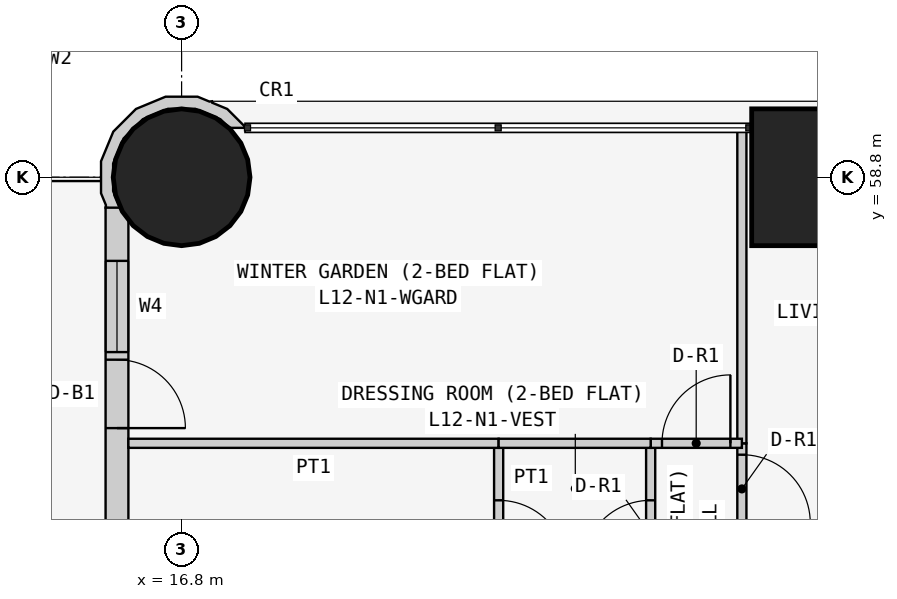
"""IFC4 building model, lengths in metres.
Left out: names, types, materials, properties, quantities, classifications, styles, units other than length and angle.
Written with IfcOpenShell. Run it as: python <this file> out.ifc"""

import sys

from ifc_helpers import new_model, si_unit, direction, frame, frame_2d, origin, origin_2d, place, context, subcontext, project, spatial, polyline, rectangle, circle, outline, extrude, element, fill, save


model = new_model("IFC4")
c1 = context("Model", 3, precision=1e-05, world=origin(), true_north=direction((0.0, 1.0)))
c2 = subcontext(c1, "Body", "Model", "MODEL_VIEW")
j1 = project(units=[si_unit("LENGTHUNIT", "METRE"), si_unit("PLANEANGLEUNIT", "RADIAN")], contexts=[c1])
p1 = place(None, origin())
s1 = spatial("IfcSite", under=j1, at=p1, CompositionType="ELEMENT")
p2 = place(p1, origin())
s2 = spatial("IfcBuilding", under=s1, at=p2, CompositionType="ELEMENT")
p3 = place(p2, frame((0.0, 0.0, 52.5)))
s3 = spatial("IfcBuildingStorey", under=s2, at=p3, CompositionType="ELEMENT", Elevation=52.5)
p4 = place(p3, frame((16.8, 58.8, 0.0), z_axis=(0.0, 0.0, 1.0), x_axis=(1.0, 0.0, 0.0)))
e1 = element("IfcColumn", 1, at=p4, inside=s3, PredefinedType="COLUMN", context=c2, shape_type="SweptSolid", body=[
    extrude(circle(Radius=0.9, at=origin_2d()), origin(), (0.0, 0.0, 1.0), 3.6),
])
p5 = place(p3, frame((25.2, 58.8, 0.0), z_axis=(0.0, 0.0, 1.0), x_axis=(1.0, 0.0, 0.0)))
e2 = element("IfcColumn", 2, at=p5, inside=s3, PredefinedType="COLUMN", context=c2, shape_type="SweptSolid", body=[
    extrude(rectangle(XDim=1.8, YDim=1.8, at=origin_2d()), origin(), (0.0, 0.0, 1.0), 3.6),
])
p6 = place(p3, frame((15.95, 58.4, 0.0), z_axis=(0.0, 0.0, 1.0), x_axis=(0.0, -1.0, 0.0)))
e3 = element("IfcWall", 3, at=p6, inside=s3, PredefinedType="SOLIDWALL", context=c2, shape_type="SweptSolid", body=[
    extrude(rectangle(XDim=15.7, YDim=0.3, at=frame_2d((7.85, 0.0))), origin(), (0.0, 0.0, 1.0), 3.45),
])
p7 = place(p6, frame((12.4, 0.0, 0.9)))
e4 = element("IfcOpeningElement", 4, at=p7, cuts=e3, PredefinedType="OPENING", context=c2, shape_type="SweptSolid", body=[
    extrude(rectangle(XDim=1.8, YDim=1.5, at=frame_2d((0.9, 0.75))), frame((0.0, 0.16, 0.0), z_axis=(0.0, -1.0, 0.0), x_axis=(1.0, 0.0, 0.0)), (0.0, 0.0, 1.0), 0.32),
])
p8 = place(p6, frame((9.55, 0.0, 1.5)))
e5 = element("IfcOpeningElement", 5, at=p8, cuts=e3, PredefinedType="OPENING", context=c2, shape_type="SweptSolid", body=[
    extrude(rectangle(XDim=0.9, YDim=0.7, at=frame_2d((0.45, 0.35))), frame((0.0, 0.16, 0.0), z_axis=(0.0, -1.0, 0.0), x_axis=(1.0, 0.0, 0.0)), (0.0, 0.0, 1.0), 0.32),
])
p9 = place(p6, frame((5.1, 0.0, 0.9)))
e6 = element("IfcOpeningElement", 6, at=p9, cuts=e3, PredefinedType="OPENING", context=c2, shape_type="SweptSolid", body=[
    extrude(rectangle(XDim=1.8, YDim=1.5, at=frame_2d((0.9, 0.75))), frame((0.0, 0.16, 0.0), z_axis=(0.0, -1.0, 0.0), x_axis=(1.0, 0.0, 0.0)), (0.0, 0.0, 1.0), 0.32),
])
p10 = place(p6, frame((2.0, 0.0, 0.0)))
e7 = element("IfcOpeningElement", 7, at=p10, cuts=e3, PredefinedType="OPENING", context=c2, shape_type="SweptSolid", body=[
    extrude(rectangle(XDim=0.9, YDim=2.4, at=frame_2d((0.45, 1.2))), frame((0.0, 0.16, 0.0), z_axis=(0.0, -1.0, 0.0), x_axis=(1.0, 0.0, 0.0)), (0.0, 0.0, 1.0), 0.32),
])
p11 = place(p6, frame((0.7, 0.0, 0.9)))
e8 = element("IfcOpeningElement", 8, at=p11, cuts=e3, PredefinedType="OPENING", context=c2, shape_type="SweptSolid", body=[
    extrude(rectangle(XDim=1.2, YDim=1.5, at=frame_2d((0.6, 0.75))), frame((0.0, 0.16, 0.0), z_axis=(0.0, -1.0, 0.0), x_axis=(1.0, 0.0, 0.0)), (0.0, 0.0, 1.0), 0.32),
])
p12 = place(p3, frame((17.567, 59.411, 0.0), z_axis=(0.0, 0.0, 1.0), x_axis=(-0.377204953059, 0.926129809145, 0.0)))
e9 = element("IfcWall", 9, at=p12, inside=s3, PredefinedType="SOLIDWALL", context=c2, shape_type="SweptSolid", body=[
    extrude(outline(polyline([(-0.27, 2.017), (-0.37, 1.841), (-0.102, 1.842), (0.23, 1.707), (0.484, 1.455), (0.624, 1.125), (0.626, 0.766), (0.491, 0.434), (0.239, 0.18), (0.09, 0.117), (0.011, -0.078), (0.024, -0.083), (0.329, 0.045), (0.48, 0.198), (0.499, 0.193), (0.508, 0.225), (0.626, 0.345), (0.785, 0.736), (0.782, 1.157), (0.619, 1.546), (0.319, 1.842), (-0.072, 2.002), (-0.24, 2.0), (-0.27, 2.017)])), origin(), (0.0, 0.0, 1.0), 3.45),
])
p13 = place(p3, frame((24.171, 55.3, 0.0), z_axis=(0.0, 0.0, 1.0), x_axis=(0.0, -1.0, 0.0)))
e10 = element("IfcWall", 10, at=p13, inside=s3, PredefinedType="PARTITIONING", context=c2, shape_type="SweptSolid", body=[
    extrude(rectangle(XDim=1.2, YDim=0.12, at=frame_2d((0.6, 0.0))), origin(), (0.0, 0.0, 1.0), 3.45),
])
p14 = place(p13, frame((0.15, 0.0, 0.0)))
e11 = element("IfcOpeningElement", 11, at=p14, cuts=e10, PredefinedType="OPENING", context=c2, shape_type="SweptSolid", body=[
    extrude(rectangle(XDim=0.9, YDim=2.1, at=frame_2d((0.45, 1.05))), frame((0.0, 0.07, 0.0), z_axis=(0.0, -1.0, 0.0), x_axis=(1.0, 0.0, 0.0)), (0.0, 0.0, 1.0), 0.14),
])
p15 = place(p3, frame((24.171, 59.45, 0.0), z_axis=(0.0, 0.0, 1.0), x_axis=(0.0, -1.0, 0.0)))
e12 = element("IfcWall", 12, at=p15, inside=s3, PredefinedType="PARTITIONING", context=c2, shape_type="SweptSolid", body=[
    extrude(rectangle(XDim=4.15, YDim=0.12, at=frame_2d((2.075, 0.0))), origin(), (0.0, 0.0, 1.0), 3.45),
])
p16 = place(p3, frame((22.971, 55.3, 0.0), z_axis=(0.0, 0.0, 1.0), x_axis=(0.0, -1.0, 0.0)))
e13 = element("IfcWall", 13, at=p16, inside=s3, PredefinedType="PARTITIONING", context=c2, shape_type="SweptSolid", body=[
    extrude(rectangle(XDim=2.3, YDim=0.12, at=frame_2d((1.15, 0.0))), origin(), (0.0, 0.0, 1.0), 3.45),
])
p17 = place(p16, frame((0.75, 0.0, 0.0)))
e14 = element("IfcOpeningElement", 14, at=p17, cuts=e13, PredefinedType="OPENING", context=c2, shape_type="SweptSolid", body=[
    extrude(rectangle(XDim=0.9, YDim=2.1, at=frame_2d((0.45, 1.05))), frame((0.0, 0.07, 0.0), z_axis=(0.0, -1.0, 0.0), x_axis=(1.0, 0.0, 0.0)), (0.0, 0.0, 1.0), 0.14),
])
p18 = place(p3, frame((24.171, 55.3, 0.0), z_axis=(0.0, 0.0, 1.0), x_axis=(-1.0, 0.0, 0.0)))
e15 = element("IfcWall", 15, at=p18, inside=s3, PredefinedType="PARTITIONING", context=c2, shape_type="SweptSolid", body=[
    extrude(rectangle(XDim=1.2, YDim=0.12, at=frame_2d((0.6, 0.0))), origin(), (0.0, 0.0, 1.0), 3.45),
])
p19 = place(p18, frame((0.151, 0.0, 0.0)))
e16 = element("IfcOpeningElement", 16, at=p19, cuts=e15, PredefinedType="OPENING", context=c2, shape_type="SweptSolid", body=[
    extrude(rectangle(XDim=0.9, YDim=2.1, at=frame_2d((0.45, 1.05))), frame((0.0, 0.07, 0.0), z_axis=(0.0, -1.0, 0.0), x_axis=(1.0, 0.0, 0.0)), (0.0, 0.0, 1.0), 0.14),
])
p20 = place(p3, frame((20.971, 55.3, 0.0), z_axis=(0.0, 0.0, 1.0), x_axis=(0.0, -1.0, 0.0)))
e17 = element("IfcWall", 17, at=p20, inside=s3, PredefinedType="PARTITIONING", context=c2, shape_type="SweptSolid", body=[
    extrude(rectangle(XDim=2.3, YDim=0.12, at=frame_2d((1.15, 0.0))), origin(), (0.0, 0.0, 1.0), 2.848),
])
p21 = place(p20, frame((0.75, 0.0, 0.0)))
e18 = element("IfcOpeningElement", 18, at=p21, cuts=e17, PredefinedType="OPENING", context=c2, shape_type="SweptSolid", body=[
    extrude(rectangle(XDim=0.9, YDim=2.1, at=frame_2d((0.45, 1.05))), frame((0.0, 0.07, 0.0), z_axis=(0.0, -1.0, 0.0), x_axis=(1.0, 0.0, 0.0)), (0.0, 0.0, 1.0), 0.14),
])
p22 = place(p3, frame((16.1, 55.3, 0.0), z_axis=(0.0, 0.0, 1.0), x_axis=(1.0, 0.0, 0.0)))
e19 = element("IfcWall", 19, at=p22, inside=s3, PredefinedType="PARTITIONING", context=c2, shape_type="SweptSolid", body=[
    extrude(rectangle(XDim=4.871, YDim=0.12, at=frame_2d((2.436, 0.0))), origin(), (0.0, 0.0, 1.0), 3.45),
])
p23 = place(p3, frame((22.971, 55.3, 0.0), z_axis=(0.0, 0.0, 1.0), x_axis=(-1.0, 0.0, 0.0)))
e20 = element("IfcWall", 20, at=p23, inside=s3, PredefinedType="PARTITIONING", context=c2, shape_type="SweptSolid", body=[
    extrude(rectangle(XDim=2.0, YDim=0.12, at=frame_2d((1.0, 0.0))), origin(), (0.0, 0.0, 1.0), 3.45),
])
p24 = place(p10, origin())
e21 = element("IfcDoor", 21, at=p24, inside=s3, OperationType="SINGLE_SWING_RIGHT", PredefinedType="DOOR", context=c2, shape_type="SweptSolid", body=[
    extrude(rectangle(XDim=0.9, YDim=2.4, at=frame_2d((0.45, 1.2))), frame((0.0, 0.025, 0.0), z_axis=(0.0, -1.0, 0.0), x_axis=(1.0, 0.0, 0.0)), (0.0, 0.0, 1.0), 0.05),
])
fill(e7, e21)
p25 = place(p11, origin())
e22 = element("IfcWindow", 22, at=p25, inside=s3, PartitioningType="SINGLE_PANEL", PredefinedType="WINDOW", context=c2, shape_type="SweptSolid", body=[
    extrude(rectangle(XDim=1.2, YDim=1.5, at=frame_2d((0.6, 0.75))), frame((0.0, 0.03, 0.0), z_axis=(0.0, -1.0, 0.0), x_axis=(1.0, 0.0, 0.0)), (0.0, 0.0, 1.0), 0.06),
])
fill(e8, e22)
p26 = place(p14, origin())
e23 = element("IfcDoor", 23, at=p26, inside=s3, OperationType="SINGLE_SWING_RIGHT", PredefinedType="DOOR", context=c2, shape_type="SweptSolid", body=[
    extrude(rectangle(XDim=0.9, YDim=2.1, at=frame_2d((0.45, 1.05))), frame((0.0, 0.025, 0.0), z_axis=(0.0, -1.0, 0.0), x_axis=(1.0, 0.0, 0.0)), (0.0, 0.0, 1.0), 0.05),
])
fill(e11, e23)
p27 = place(p17, frame((0.9, 0.0, 0.0), z_axis=(0.0, 0.0, 1.0), x_axis=(-1.0, 0.0, 0.0)))
e24 = element("IfcDoor", 24, at=p27, inside=s3, OperationType="SINGLE_SWING_LEFT", PredefinedType="DOOR", context=c2, shape_type="SweptSolid", body=[
    extrude(rectangle(XDim=0.9, YDim=2.1, at=frame_2d((0.45, 1.05))), frame((0.0, 0.025, 0.0), z_axis=(0.0, -1.0, 0.0), x_axis=(1.0, 0.0, 0.0)), (0.0, 0.0, 1.0), 0.05),
])
fill(e14, e24)
p28 = place(p21, origin())
e25 = element("IfcDoor", 25, at=p28, inside=s3, OperationType="SINGLE_SWING_RIGHT", PredefinedType="DOOR", context=c2, shape_type="SweptSolid", body=[
    extrude(rectangle(XDim=0.9, YDim=2.1, at=frame_2d((0.45, 1.05))), frame((0.0, 0.025, 0.0), z_axis=(0.0, -1.0, 0.0), x_axis=(1.0, 0.0, 0.0)), (0.0, 0.0, 1.0), 0.05),
])
fill(e18, e25)
p29 = place(p19, frame((0.9, 0.0, 0.0), z_axis=(0.0, 0.0, 1.0), x_axis=(-1.0, 0.0, 0.0)))
e26 = element("IfcDoor", 26, at=p29, inside=s3, OperationType="SINGLE_SWING_RIGHT", PredefinedType="DOOR", context=c2, shape_type="SweptSolid", body=[
    extrude(rectangle(XDim=0.9, YDim=2.1, at=frame_2d((0.45, 1.05))), frame((0.0, 0.025, 0.0), z_axis=(0.0, -1.0, 0.0), x_axis=(1.0, 0.0, 0.0)), (0.0, 0.0, 1.0), 0.05),
])
fill(e16, e26)
save(model, sys.argv[1])
